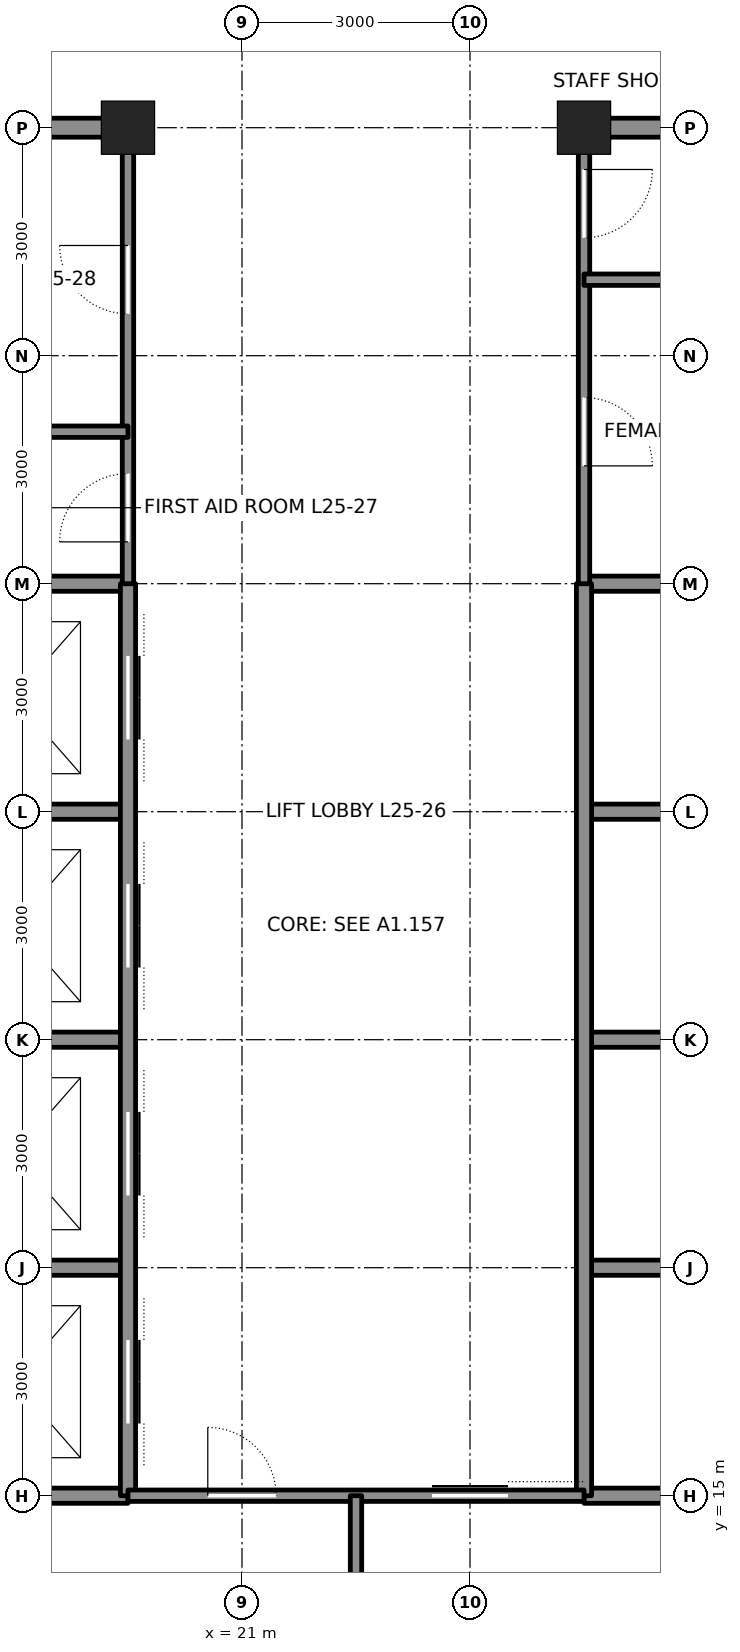
"""IFC4 building model, lengths in metres.
Left out: names, types, materials, properties, quantities, classifications, styles, units other than length and angle.
Written with IfcOpenShell. Run it as: python <this file> out.ifc"""

import sys

from ifc_helpers import new_model, si_unit, direction, frame, frame_2d, origin, origin_2d, place, context, subcontext, project, spatial, rectangle, hollow_rectangle, extrude, element, fill, save


model = new_model("IFC4")
c1 = context("Model", 3, precision=1e-05, world=origin(), true_north=direction((0.0, 1.0)))
c2 = subcontext(c1, "Body", "Model", "MODEL_VIEW")
j1 = project(units=[si_unit("LENGTHUNIT", "METRE"), si_unit("PLANEANGLEUNIT", "RADIAN")], contexts=[c1])
p1 = place(None, origin())
s1 = spatial("IfcSite", under=j1, at=p1, CompositionType="ELEMENT")
p2 = place(p1, origin())
s2 = spatial("IfcBuilding", under=s1, at=p2, CompositionType="ELEMENT")
p3 = place(p2, frame((0.0, 0.0, 119.4)))
s3 = spatial("IfcBuildingStorey", under=s2, at=p3, CompositionType="ELEMENT", Elevation=119.4)
for number, where, z_axis, x_axis in (
    (1, (19.5, 33.0, 0.0), (0.0, 0.0, 1.0), (1.0, 0.0, 0.0)),
    (2, (25.5, 33.0, 0.0), (0.0, 0.0, 1.0), (1.0, 0.0, 0.0)),
):
    element("IfcColumn", number, at=place(p3, frame(where, z_axis=z_axis, x_axis=x_axis)), inside=s3, PredefinedType="COLUMN", context=c2, shape_type="SweptSolid", body=[
        extrude(hollow_rectangle(XDim=0.7, YDim=0.7, WallThickness=0.07, at=origin_2d()), origin(), (0.0, 0.0, 1.0), 4.2),
    ])
for number, where, z_axis, x_axis in (
    (3, (12.0, 15.0, 0.0), (0.0, 0.0, 1.0), (1.0, 0.0, 0.0)),
    (4, (25.5, 15.0, 0.0), (0.0, 0.0, 1.0), (1.0, 0.0, 0.0)),
):
    element("IfcWall", number, at=place(p3, frame(where, z_axis=z_axis, x_axis=x_axis)), inside=s3, PredefinedType="SOLIDWALL", context=c2, shape_type="SweptSolid", body=[
        extrude(rectangle(XDim=7.5, YDim=0.2, at=frame_2d((3.75, 0.0))), origin(), (0.0, 0.0, 1.0), 4.04),
    ])
for number, where, z_axis, x_axis in (
    (5, (16.75, 24.0, 0.0), (0.0, 0.0, 1.0), (1.0, 0.0, 0.0)),
    (6, (25.5, 24.0, 0.0), (0.0, 0.0, 1.0), (1.0, 0.0, 0.0)),
):
    element("IfcWall", number, at=place(p3, frame(where, z_axis=z_axis, x_axis=x_axis)), inside=s3, PredefinedType="SOLIDWALL", context=c2, shape_type="SweptSolid", body=[
        extrude(rectangle(XDim=2.75, YDim=0.2, at=frame_2d((1.375, 0.0))), origin(), (0.0, 0.0, 1.0), 3.09),
    ])
p4 = place(p3, frame((12.0, 27.0, 0.0), z_axis=(0.0, 0.0, 1.0), x_axis=(1.0, 0.0, 0.0)))
e7 = element("IfcWall", 7, at=p4, inside=s3, PredefinedType="SOLIDWALL", context=c2, shape_type="SweptSolid", body=[
    extrude(rectangle(XDim=7.5, YDim=0.2, at=frame_2d((3.75, 0.0))), origin(), (0.0, 0.0, 1.0), 4.04),
])
p5 = place(p4, frame((1.65, 0.0, 0.0)))
e8 = element("IfcOpeningElement", 8, at=p5, cuts=e7, PredefinedType="OPENING", context=c2, shape_type="SweptSolid", body=[
    extrude(rectangle(XDim=1.2, YDim=2.1, at=frame_2d((0.6, 1.05))), frame((0.0, 0.11, 0.0), z_axis=(0.0, -1.0, 0.0), x_axis=(1.0, 0.0, 0.0)), (0.0, 0.0, 1.0), 0.22),
])
p6 = place(p3, frame((25.5, 27.0, 0.0), z_axis=(0.0, 0.0, 1.0), x_axis=(1.0, 0.0, 0.0)))
e9 = element("IfcWall", 9, at=p6, inside=s3, PredefinedType="SOLIDWALL", context=c2, shape_type="SweptSolid", body=[
    extrude(rectangle(XDim=3.0, YDim=0.2, at=frame_2d((1.5, 0.0))), origin(), (0.0, 0.0, 1.0), 4.04),
])
for number, where, z_axis, x_axis in (
    (10, (16.75, 33.0, 0.0), (0.0, 0.0, 1.0), (1.0, 0.0, 0.0)),
    (11, (25.75, 33.0, 0.0), (0.0, 0.0, 1.0), (1.0, 0.0, 0.0)),
):
    element("IfcWall", number, at=place(p3, frame(where, z_axis=z_axis, x_axis=x_axis)), inside=s3, PredefinedType="SOLIDWALL", context=c2, shape_type="SweptSolid", body=[
        extrude(rectangle(XDim=2.5, YDim=0.25, at=frame_2d((1.25, 0.0))), origin(), (0.0, 0.0, 1.0), 3.182),
    ])
p7 = place(p3, frame((16.5, 18.0, 0.0), z_axis=(0.0, 0.0, 1.0), x_axis=(1.0, 0.0, 0.0)))
e12 = element("IfcWall", 12, at=p7, inside=s3, PredefinedType="SOLIDWALL", context=c2, shape_type="SweptSolid", body=[
    extrude(rectangle(XDim=3.0, YDim=0.2, at=frame_2d((1.5, 0.0))), origin(), (0.0, 0.0, 1.0), 4.04),
])
p8 = place(p3, frame((25.5, 18.0, 0.0), z_axis=(0.0, 0.0, 1.0), x_axis=(1.0, 0.0, 0.0)))
e13 = element("IfcWall", 13, at=p8, inside=s3, PredefinedType="SOLIDWALL", context=c2, shape_type="SweptSolid", body=[
    extrude(rectangle(XDim=7.5, YDim=0.2, at=frame_2d((3.75, 0.0))), origin(), (0.0, 0.0, 1.0), 4.04),
])
p9 = place(p8, frame((4.65, 0.0, 0.0)))
e14 = element("IfcOpeningElement", 14, at=p9, cuts=e13, PredefinedType="OPENING", context=c2, shape_type="SweptSolid", body=[
    extrude(rectangle(XDim=1.2, YDim=2.1, at=frame_2d((0.6, 1.05))), frame((0.0, 0.11, 0.0), z_axis=(0.0, -1.0, 0.0), x_axis=(1.0, 0.0, 0.0)), (0.0, 0.0, 1.0), 0.22),
])
for number, where, z_axis, x_axis in (
    (15, (16.75, 21.0, 0.0), (0.0, 0.0, 1.0), (1.0, 0.0, 0.0)),
    (16, (25.5, 21.0, 0.0), (0.0, 0.0, 1.0), (1.0, 0.0, 0.0)),
):
    element("IfcWall", number, at=place(p3, frame(where, z_axis=z_axis, x_axis=x_axis)), inside=s3, PredefinedType="SOLIDWALL", context=c2, shape_type="SweptSolid", body=[
        extrude(rectangle(XDim=2.75, YDim=0.2, at=frame_2d((1.375, 0.0))), origin(), (0.0, 0.0, 1.0), 3.09),
    ])
p10 = place(p3, frame((19.5, 15.0, 0.0), z_axis=(0.0, 0.0, 1.0), x_axis=(0.0, 1.0, 0.0)))
e17 = element("IfcWall", 17, at=p10, inside=s3, PredefinedType="SOLIDWALL", context=c2, shape_type="SweptSolid", body=[
    extrude(rectangle(XDim=12.0, YDim=0.2, at=frame_2d((6.0, 0.0))), origin(), (0.0, 0.0, 1.0), 3.065),
])
p11 = place(p10, frame((0.95, 0.0, 0.0)))
e18 = element("IfcOpeningElement", 18, at=p11, cuts=e17, PredefinedType="OPENING", context=c2, shape_type="SweptSolid", body=[
    extrude(rectangle(XDim=1.1, YDim=2.1, at=frame_2d((0.55, 1.05))), frame((0.0, 0.11, 0.0), z_axis=(0.0, -1.0, 0.0), x_axis=(1.0, 0.0, 0.0)), (0.0, 0.0, 1.0), 0.22),
])
p12 = place(p10, frame((3.95, 0.0, 0.0)))
e19 = element("IfcOpeningElement", 19, at=p12, cuts=e17, PredefinedType="OPENING", context=c2, shape_type="SweptSolid", body=[
    extrude(rectangle(XDim=1.1, YDim=2.1, at=frame_2d((0.55, 1.05))), frame((0.0, 0.11, 0.0), z_axis=(0.0, -1.0, 0.0), x_axis=(1.0, 0.0, 0.0)), (0.0, 0.0, 1.0), 0.22),
])
p13 = place(p10, frame((6.95, 0.0, 0.0)))
e20 = element("IfcOpeningElement", 20, at=p13, cuts=e17, PredefinedType="OPENING", context=c2, shape_type="SweptSolid", body=[
    extrude(rectangle(XDim=1.1, YDim=2.1, at=frame_2d((0.55, 1.05))), frame((0.0, 0.11, 0.0), z_axis=(0.0, -1.0, 0.0), x_axis=(1.0, 0.0, 0.0)), (0.0, 0.0, 1.0), 0.22),
])
p14 = place(p10, frame((9.95, 0.0, 0.0)))
e21 = element("IfcOpeningElement", 21, at=p14, cuts=e17, PredefinedType="OPENING", context=c2, shape_type="SweptSolid", body=[
    extrude(rectangle(XDim=1.1, YDim=2.1, at=frame_2d((0.55, 1.05))), frame((0.0, 0.11, 0.0), z_axis=(0.0, -1.0, 0.0), x_axis=(1.0, 0.0, 0.0)), (0.0, 0.0, 1.0), 0.22),
])
p15 = place(p3, frame((19.5, 27.0, 0.0), z_axis=(0.0, 0.0, 1.0), x_axis=(0.0, 1.0, 0.0)))
e22 = element("IfcWall", 22, at=p15, inside=s3, PredefinedType="PARTITIONING", context=c2, shape_type="SweptSolid", body=[
    extrude(rectangle(XDim=5.75, YDim=0.15, at=frame_2d((2.875, 0.0))), origin(), (0.0, 0.0, 1.0), 3.065),
])
p16 = place(p15, frame((0.55, 0.0, 0.0)))
e23 = element("IfcOpeningElement", 23, at=p16, cuts=e22, PredefinedType="OPENING", context=c2, shape_type="SweptSolid", body=[
    extrude(rectangle(XDim=0.9, YDim=2.1, at=frame_2d((0.45, 1.05))), frame((0.0, 0.085, 0.0), z_axis=(0.0, -1.0, 0.0), x_axis=(1.0, 0.0, 0.0)), (0.0, 0.0, 1.0), 0.17),
])
p17 = place(p15, frame((3.55, 0.0, 0.0)))
e24 = element("IfcOpeningElement", 24, at=p17, cuts=e22, PredefinedType="OPENING", context=c2, shape_type="SweptSolid", body=[
    extrude(rectangle(XDim=0.9, YDim=2.1, at=frame_2d((0.45, 1.05))), frame((0.0, 0.085, 0.0), z_axis=(0.0, -1.0, 0.0), x_axis=(1.0, 0.0, 0.0)), (0.0, 0.0, 1.0), 0.17),
])
p18 = place(p3, frame((25.5, 15.0, 0.0), z_axis=(0.0, 0.0, 1.0), x_axis=(0.0, 1.0, 0.0)))
e25 = element("IfcWall", 25, at=p18, inside=s3, PredefinedType="SOLIDWALL", context=c2, shape_type="SweptSolid", body=[
    extrude(rectangle(XDim=12.0, YDim=0.2, at=frame_2d((6.0, 0.0))), origin(), (0.0, 0.0, 1.0), 3.065),
])
p19 = place(p3, frame((25.5, 27.0, 0.0), z_axis=(0.0, 0.0, 1.0), x_axis=(0.0, 1.0, 0.0)))
e26 = element("IfcWall", 26, at=p19, inside=s3, PredefinedType="PARTITIONING", context=c2, shape_type="SweptSolid", body=[
    extrude(rectangle(XDim=5.75, YDim=0.15, at=frame_2d((2.875, 0.0))), origin(), (0.0, 0.0, 1.0), 3.065),
])
p20 = place(p19, frame((1.55, 0.0, 0.0)))
e27 = element("IfcOpeningElement", 27, at=p20, cuts=e26, PredefinedType="OPENING", context=c2, shape_type="SweptSolid", body=[
    extrude(rectangle(XDim=0.9, YDim=2.1, at=frame_2d((0.45, 1.05))), frame((0.0, 0.085, 0.0), z_axis=(0.0, -1.0, 0.0), x_axis=(1.0, 0.0, 0.0)), (0.0, 0.0, 1.0), 0.17),
])
p21 = place(p19, frame((4.55, 0.0, 0.0)))
e28 = element("IfcOpeningElement", 28, at=p21, cuts=e26, PredefinedType="OPENING", context=c2, shape_type="SweptSolid", body=[
    extrude(rectangle(XDim=0.9, YDim=2.1, at=frame_2d((0.45, 1.05))), frame((0.0, 0.085, 0.0), z_axis=(0.0, -1.0, 0.0), x_axis=(1.0, 0.0, 0.0)), (0.0, 0.0, 1.0), 0.17),
])
p22 = place(p3, frame((19.5, 15.0, 0.0), z_axis=(0.0, 0.0, 1.0), x_axis=(1.0, 0.0, 0.0)))
e29 = element("IfcWall", 29, at=p22, inside=s3, PredefinedType="PARTITIONING", context=c2, shape_type="SweptSolid", body=[
    extrude(rectangle(XDim=6.0, YDim=0.15, at=frame_2d((3.0, 0.0))), origin(), (0.0, 0.0, 1.0), 4.04),
])
p23 = place(p22, frame((4.0, 0.0, 0.0)))
e30 = element("IfcOpeningElement", 30, at=p23, cuts=e29, PredefinedType="OPENING", context=c2, shape_type="SweptSolid", body=[
    extrude(rectangle(XDim=1.0, YDim=2.1, at=frame_2d((0.5, 1.05))), frame((0.0, 0.085, 0.0), z_axis=(0.0, -1.0, 0.0), x_axis=(1.0, 0.0, 0.0)), (0.0, 0.0, 1.0), 0.17),
])
p24 = place(p22, frame((1.05, 0.0, 0.0)))
e31 = element("IfcOpeningElement", 31, at=p24, cuts=e29, PredefinedType="OPENING", context=c2, shape_type="SweptSolid", body=[
    extrude(rectangle(XDim=0.9, YDim=2.1, at=frame_2d((0.45, 1.05))), frame((0.0, 0.085, 0.0), z_axis=(0.0, -1.0, 0.0), x_axis=(1.0, 0.0, 0.0)), (0.0, 0.0, 1.0), 0.17),
])
for number, where, z_axis, x_axis in (
    (32, (22.5, 15.0, 0.0), (0.0, 0.0, 1.0), (0.0, -1.0, 0.0)),
    (33, (16.5, 29.0, 0.0), (0.0, 0.0, 1.0), (1.0, 0.0, 0.0)),
    (34, (25.5, 31.0, 0.0), (0.0, 0.0, 1.0), (1.0, 0.0, 0.0)),
):
    element("IfcWall", number, at=place(p3, frame(where, z_axis=z_axis, x_axis=x_axis)), inside=s3, PredefinedType="PARTITIONING", context=c2, shape_type="SweptSolid", body=[
        extrude(rectangle(XDim=3.0, YDim=0.15, at=frame_2d((1.5, 0.0))), origin(), (0.0, 0.0, 1.0), 4.04),
    ])
p25 = place(p16, origin())
e35 = element("IfcDoor", 35, at=p25, inside=s3, OperationType="SINGLE_SWING_LEFT", PredefinedType="DOOR", context=c2, shape_type="SweptSolid", body=[
    extrude(rectangle(XDim=0.9, YDim=2.1, at=frame_2d((0.45, 1.05))), frame((0.0, 0.025, 0.0), z_axis=(0.0, -1.0, 0.0), x_axis=(1.0, 0.0, 0.0)), (0.0, 0.0, 1.0), 0.05),
])
fill(e23, e35)
p26 = place(p17, origin())
e36 = element("IfcDoor", 36, at=p26, inside=s3, OperationType="SINGLE_SWING_RIGHT", PredefinedType="DOOR", context=c2, shape_type="SweptSolid", body=[
    extrude(rectangle(XDim=0.9, YDim=2.1, at=frame_2d((0.45, 1.05))), frame((0.0, 0.025, 0.0), z_axis=(0.0, -1.0, 0.0), x_axis=(1.0, 0.0, 0.0)), (0.0, 0.0, 1.0), 0.05),
])
fill(e24, e36)
p27 = place(p20, frame((0.9, 0.0, 0.0), z_axis=(0.0, 0.0, 1.0), x_axis=(-1.0, 0.0, 0.0)))
e37 = element("IfcDoor", 37, at=p27, inside=s3, OperationType="SINGLE_SWING_RIGHT", PredefinedType="DOOR", context=c2, shape_type="SweptSolid", body=[
    extrude(rectangle(XDim=0.9, YDim=2.1, at=frame_2d((0.45, 1.05))), frame((0.0, 0.025, 0.0), z_axis=(0.0, -1.0, 0.0), x_axis=(1.0, 0.0, 0.0)), (0.0, 0.0, 1.0), 0.05),
])
fill(e27, e37)
p28 = place(p21, frame((0.9, 0.0, 0.0), z_axis=(0.0, 0.0, 1.0), x_axis=(-1.0, 0.0, 0.0)))
e38 = element("IfcDoor", 38, at=p28, inside=s3, OperationType="SINGLE_SWING_LEFT", PredefinedType="DOOR", context=c2, shape_type="SweptSolid", body=[
    extrude(rectangle(XDim=0.9, YDim=2.1, at=frame_2d((0.45, 1.05))), frame((0.0, 0.025, 0.0), z_axis=(0.0, -1.0, 0.0), x_axis=(1.0, 0.0, 0.0)), (0.0, 0.0, 1.0), 0.05),
])
fill(e28, e38)
p29 = place(p23, origin())
e39 = element("IfcDoor", 39, at=p29, inside=s3, OperationType="SLIDING_TO_LEFT", PredefinedType="DOOR", context=c2, shape_type="SweptSolid", body=[
    extrude(rectangle(XDim=1.0, YDim=2.1, at=frame_2d((0.5, 1.05))), frame((0.0, 0.025, 0.0), z_axis=(0.0, -1.0, 0.0), x_axis=(1.0, 0.0, 0.0)), (0.0, 0.0, 1.0), 0.05),
])
fill(e30, e39)
p30 = place(p24, origin())
e40 = element("IfcDoor", 40, at=p30, inside=s3, OperationType="SINGLE_SWING_LEFT", PredefinedType="DOOR", context=c2, shape_type="SweptSolid", body=[
    extrude(rectangle(XDim=0.9, YDim=2.1, at=frame_2d((0.45, 1.05))), frame((0.0, 0.025, 0.0), z_axis=(0.0, -1.0, 0.0), x_axis=(1.0, 0.0, 0.0)), (0.0, 0.0, 1.0), 0.05),
])
fill(e31, e40)
p31 = place(p11, origin())
e41 = element("IfcDoor", 41, at=p31, inside=s3, OperationType="DOUBLE_DOOR_SLIDING", PredefinedType="DOOR", context=c2, shape_type="SweptSolid", body=[
    extrude(rectangle(XDim=1.1, YDim=2.1, at=frame_2d((0.55, 1.05))), frame((0.0, 0.025, 0.0), z_axis=(0.0, -1.0, 0.0), x_axis=(1.0, 0.0, 0.0)), (0.0, 0.0, 1.0), 0.05),
])
fill(e18, e41)
p32 = place(p12, origin())
e42 = element("IfcDoor", 42, at=p32, inside=s3, OperationType="DOUBLE_DOOR_SLIDING", PredefinedType="DOOR", context=c2, shape_type="SweptSolid", body=[
    extrude(rectangle(XDim=1.1, YDim=2.1, at=frame_2d((0.55, 1.05))), frame((0.0, 0.025, 0.0), z_axis=(0.0, -1.0, 0.0), x_axis=(1.0, 0.0, 0.0)), (0.0, 0.0, 1.0), 0.05),
])
fill(e19, e42)
p33 = place(p13, origin())
e43 = element("IfcDoor", 43, at=p33, inside=s3, OperationType="DOUBLE_DOOR_SLIDING", PredefinedType="DOOR", context=c2, shape_type="SweptSolid", body=[
    extrude(rectangle(XDim=1.1, YDim=2.1, at=frame_2d((0.55, 1.05))), frame((0.0, 0.025, 0.0), z_axis=(0.0, -1.0, 0.0), x_axis=(1.0, 0.0, 0.0)), (0.0, 0.0, 1.0), 0.05),
])
fill(e20, e43)
p34 = place(p14, origin())
e44 = element("IfcDoor", 44, at=p34, inside=s3, OperationType="DOUBLE_DOOR_SLIDING", PredefinedType="DOOR", context=c2, shape_type="SweptSolid", body=[
    extrude(rectangle(XDim=1.1, YDim=2.1, at=frame_2d((0.55, 1.05))), frame((0.0, 0.025, 0.0), z_axis=(0.0, -1.0, 0.0), x_axis=(1.0, 0.0, 0.0)), (0.0, 0.0, 1.0), 0.05),
])
fill(e21, e44)
save(model, sys.argv[1])
